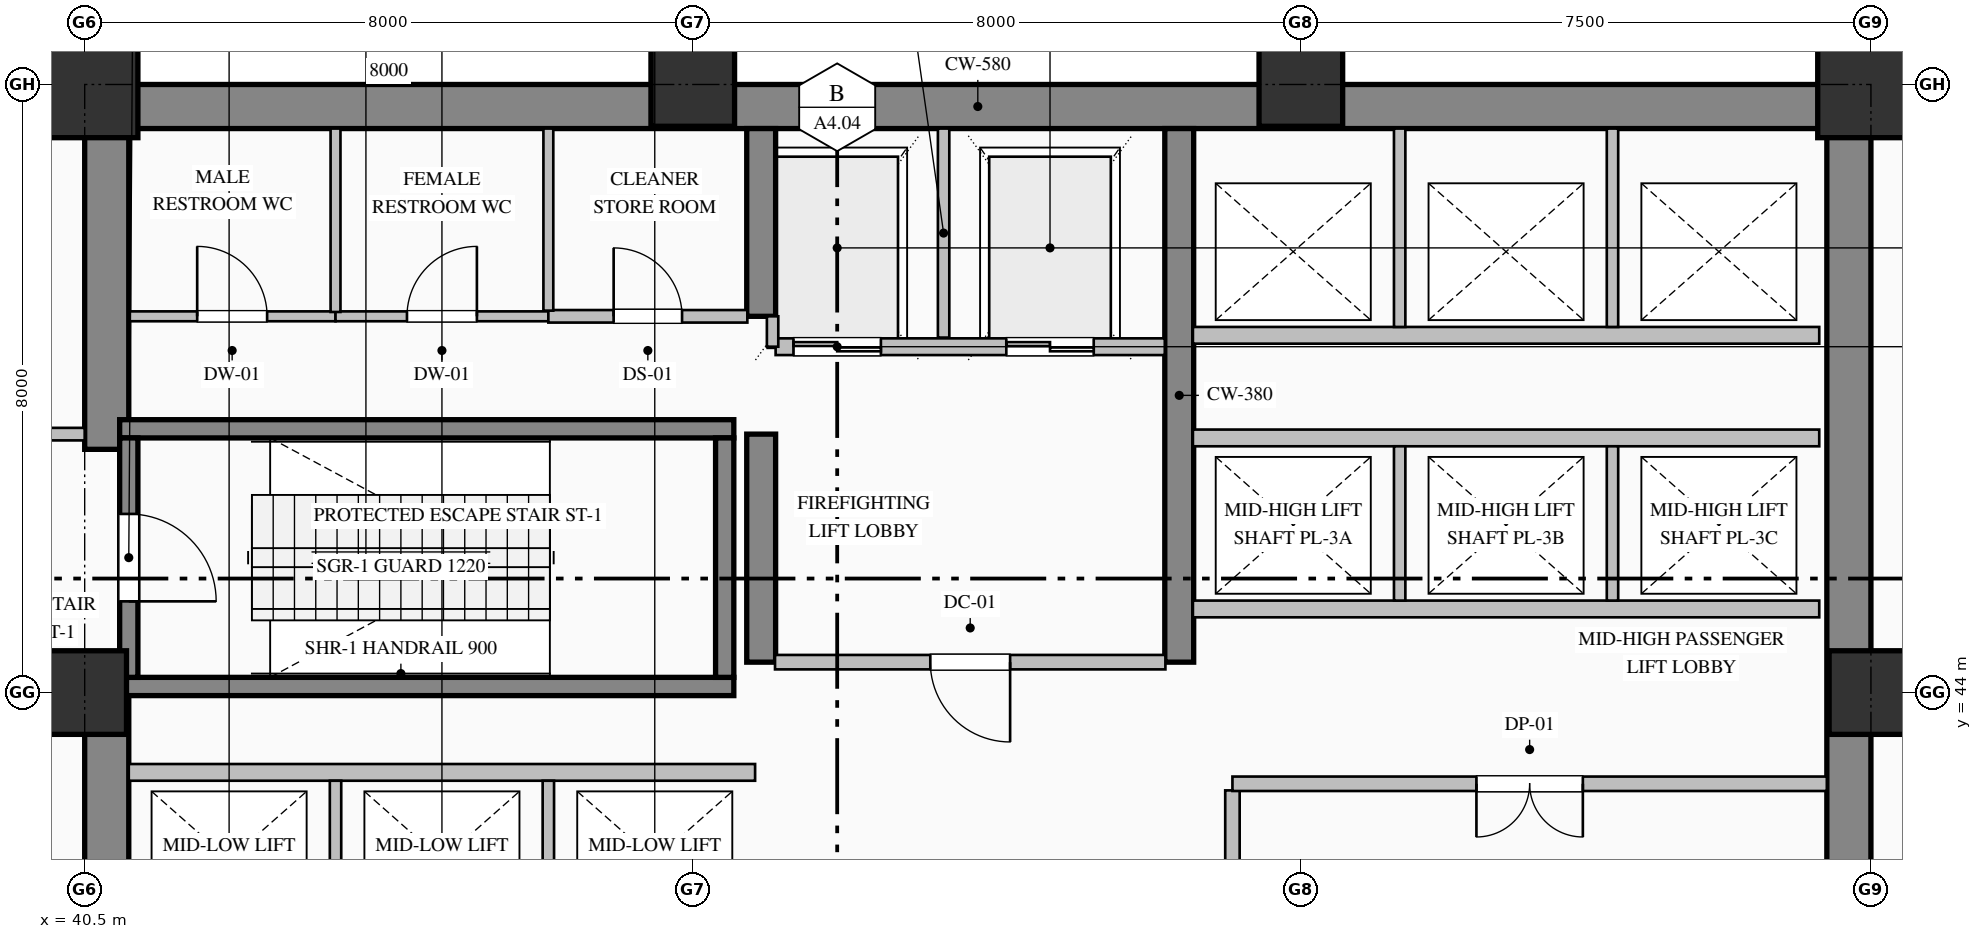
"""IFC4 building model, lengths in metres.
Left out: names, types, materials, properties, quantities, classifications, styles, units other than length and angle.
Written with IfcOpenShell. Run it as: python <this file> out.ifc"""

import sys

from ifc_helpers import new_model, si_unit, direction, frame, frame_2d, origin, origin_2d, place, context, subcontext, project, spatial, rectangle, hollow_rectangle, extrude, element, fill, save


model = new_model("IFC4")
c1 = context("Model", 3, precision=1e-05, world=origin(), true_north=direction((0.0, 1.0)))
c2 = subcontext(c1, "Body", "Model", "MODEL_VIEW")
j1 = project(units=[si_unit("LENGTHUNIT", "METRE"), si_unit("PLANEANGLEUNIT", "RADIAN")], contexts=[c1])
p1 = place(None, origin())
s1 = spatial("IfcSite", under=j1, at=p1, CompositionType="ELEMENT")
p2 = place(p1, origin())
s2 = spatial("IfcBuilding", under=s1, at=p2, CompositionType="ELEMENT")
p3 = place(p2, frame((0.0, 0.0, 22.8)))
s3 = spatial("IfcBuildingStorey", under=s2, at=p3, CompositionType="ELEMENT", Elevation=22.8)
p4 = place(p3, frame((40.5, 51.71, 0.0), z_axis=(0.0, 0.0, 1.0), x_axis=(1.0, 0.0, 0.0)))
e1 = element("IfcWall", 1, at=p4, inside=s3, PredefinedType="SHEAR", context=c2, shape_type="SweptSolid", body=[
    extrude(rectangle(XDim=23.5, YDim=0.58, at=frame_2d((11.75, 0.0))), origin(), (0.0, 0.0, 1.0), 5.15),
])
p5 = place(p3, frame((63.71, 36.32, 0.0), z_axis=(0.0, 0.0, 1.0), x_axis=(0.0, 1.0, 0.0)))
e2 = element("IfcWall", 2, at=p5, inside=s3, PredefinedType="SHEAR", context=c2, shape_type="SweptSolid", body=[
    extrude(rectangle(XDim=15.1, YDim=0.58, at=frame_2d((7.55, 0.0))), origin(), (0.0, 0.0, 1.0), 5.15),
])
p6 = place(p3, frame((40.79, 36.58, 0.0), z_axis=(0.0, 0.0, 1.0), x_axis=(0.0, 1.0, 0.0)))
e3 = element("IfcWall", 3, at=p6, inside=s3, PredefinedType="SHEAR", context=c2, shape_type="SweptSolid", body=[
    extrude(rectangle(XDim=7.82, YDim=0.58, at=frame_2d((3.91, 0.0))), origin(), (0.0, 0.0, 1.0), 5.15),
])
p7 = place(p3, frame((40.79, 47.2, 0.0), z_axis=(0.0, 0.0, 1.0), x_axis=(0.0, 1.0, 0.0)))
e4 = element("IfcWall", 4, at=p7, inside=s3, PredefinedType="SHEAR", context=c2, shape_type="SweptSolid", body=[
    extrude(rectangle(XDim=4.22, YDim=0.58, at=frame_2d((2.11, 0.0))), origin(), (0.0, 0.0, 1.0), 5.15),
])
p8 = place(p3, frame((49.4, 44.4, 0.0), z_axis=(0.0, 0.0, 1.0), x_axis=(0.0, 1.0, 0.0)))
e5 = element("IfcWall", 5, at=p8, inside=s3, PredefinedType="SHEAR", context=c2, shape_type="SweptSolid", body=[
    extrude(rectangle(XDim=3.0, YDim=0.38, at=frame_2d((1.5, 0.0))), origin(), (0.0, 0.0, 1.0), 5.15),
])
p9 = place(p3, frame((49.4, 48.95, 0.0), z_axis=(0.0, 0.0, 1.0), x_axis=(0.0, 1.0, 0.0)))
e6 = element("IfcWall", 6, at=p9, inside=s3, PredefinedType="SHEAR", context=c2, shape_type="SweptSolid", body=[
    extrude(rectangle(XDim=2.47, YDim=0.38, at=frame_2d((1.235, 0.0))), origin(), (0.0, 0.0, 1.0), 5.15),
])
p10 = place(p3, frame((54.9, 44.4, 0.0), z_axis=(0.0, 0.0, 1.0), x_axis=(0.0, 1.0, 0.0)))
e7 = element("IfcWall", 7, at=p10, inside=s3, PredefinedType="SHEAR", context=c2, shape_type="SweptSolid", body=[
    extrude(rectangle(XDim=7.02, YDim=0.38, at=frame_2d((3.51, 0.0))), origin(), (0.0, 0.0, 1.0), 5.15),
])
p11 = place(p3, frame((40.5, 44.0, 0.0), z_axis=(0.0, 0.0, 1.0), x_axis=(1.0, 0.0, 0.0)))
e8 = element("IfcColumn", 8, at=p11, inside=s3, PredefinedType="COLUMN", context=c2, shape_type="SweptSolid", body=[
    extrude(rectangle(XDim=1.1, YDim=1.1, at=origin_2d()), origin(), (0.0, 0.0, 1.0), 5.4),
])
p12 = place(p3, frame((40.5, 52.0, 0.0), z_axis=(0.0, 0.0, 1.0), x_axis=(1.0, 0.0, 0.0)))
e9 = element("IfcColumn", 9, at=p12, inside=s3, PredefinedType="COLUMN", context=c2, shape_type="SweptSolid", body=[
    extrude(hollow_rectangle(XDim=1.4, YDim=1.4, WallThickness=0.05, at=origin_2d()), origin(), (0.0, 0.0, 1.0), 5.4),
])
for number, where, z_axis, x_axis in (
    (10, (48.5, 52.0, 0.0), (0.0, 0.0, 1.0), (1.0, 0.0, 0.0)),
    (11, (56.5, 52.0, 0.0), (0.0, 0.0, 1.0), (1.0, 0.0, 0.0)),
):
    element("IfcColumn", number, at=place(p3, frame(where, z_axis=z_axis, x_axis=x_axis)), inside=s3, PredefinedType="COLUMN", context=c2, shape_type="SweptSolid", body=[
        extrude(hollow_rectangle(XDim=1.1, YDim=1.1, WallThickness=0.04, at=origin_2d()), origin(), (0.0, 0.0, 1.0), 5.4),
    ])
p13 = place(p3, frame((64.0, 44.0, 0.0), z_axis=(0.0, 0.0, 1.0), x_axis=(1.0, 0.0, 0.0)))
e12 = element("IfcColumn", 12, at=p13, inside=s3, PredefinedType="COLUMN", context=c2, shape_type="SweptSolid", body=[
    extrude(rectangle(XDim=1.1, YDim=1.1, at=origin_2d()), origin(), (0.0, 0.0, 1.0), 5.4),
])
p14 = place(p3, frame((64.0, 52.0, 0.0), z_axis=(0.0, 0.0, 1.0), x_axis=(1.0, 0.0, 0.0)))
e13 = element("IfcColumn", 13, at=p14, inside=s3, PredefinedType="COLUMN", context=c2, shape_type="SweptSolid", body=[
    extrude(hollow_rectangle(XDim=1.4, YDim=1.4, WallThickness=0.05, at=origin_2d()), origin(), (0.0, 0.0, 1.0), 5.4),
])
p15 = place(p3, frame((63.98, 51.81, 0.0), z_axis=(0.0, 0.0, 1.0), x_axis=(1.0, 0.0, 0.0)))
e14 = element("IfcWall", 14, at=p15, inside=s3, PredefinedType="SOLIDWALL", context=c2, shape_type="SweptSolid", body=[
    extrude(rectangle(XDim=4.02, YDim=0.38, at=frame_2d((2.01, 0.0))), origin(), (0.0, 0.0, 1.0), 5.15),
])
p16 = place(p3, frame((4.0, 51.81, 0.0), z_axis=(0.0, 0.0, 1.0), x_axis=(1.0, 0.0, 0.0)))
e15 = element("IfcWall", 15, at=p16, inside=s3, PredefinedType="SOLIDWALL", context=c2, shape_type="SweptSolid", body=[
    extrude(rectangle(XDim=36.52, YDim=0.38, at=frame_2d((18.26, 0.0))), origin(), (0.0, 0.0, 1.0), 4.65),
])
p17 = place(p16, frame((16.7, 0.0, 0.85)))
e16 = element("IfcOpeningElement", 16, at=p17, cuts=e15, PredefinedType="OPENING", context=c2, shape_type="SweptSolid", body=[
    extrude(rectangle(XDim=2.6, YDim=3.1, at=frame_2d((1.3, 1.55))), frame((0.0, 0.2, 0.0), z_axis=(0.0, -1.0, 0.0), x_axis=(1.0, 0.0, 0.0)), (0.0, 0.0, 1.0), 0.4),
])
p18 = place(p16, frame((24.1, 0.0, 0.9)))
e17 = element("IfcOpeningElement", 17, at=p18, cuts=e15, PredefinedType="OPENING", context=c2, shape_type="SweptSolid", body=[
    extrude(rectangle(XDim=2.2, YDim=2.65, at=frame_2d((1.1, 1.325))), frame((0.0, 0.2, 0.0), z_axis=(0.0, -1.0, 0.0), x_axis=(1.0, 0.0, 0.0)), (0.0, 0.0, 1.0), 0.4),
])
for number, where, z_axis, x_axis in (
    (18, (40.96, 47.47, 0.0), (0.0, 0.0, 1.0), (1.0, 0.0, 0.0)),
    (19, (49.04, 44.08, 0.0), (0.0, 0.0, 1.0), (-1.0, 0.0, 0.0)),
):
    element("IfcWall", number, at=place(p3, frame(where, z_axis=z_axis, x_axis=x_axis)), inside=s3, PredefinedType="SOLIDWALL", context=c2, shape_type="SweptSolid", body=[
        extrude(rectangle(XDim=8.08, YDim=0.24, at=frame_2d((4.04, 0.0))), origin(), (0.0, 0.0, 1.0), 5.4),
    ])
p19 = place(p3, frame((41.08, 47.35, 0.0), z_axis=(0.0, 0.0, 1.0), x_axis=(0.0, -1.0, 0.0)))
e20 = element("IfcWall", 20, at=p19, inside=s3, PredefinedType="SOLIDWALL", context=c2, shape_type="SweptSolid", body=[
    extrude(rectangle(XDim=3.15, YDim=0.24, at=frame_2d((1.575, 0.0))), origin(), (0.0, 0.0, 1.0), 5.4),
])
p20 = place(p19, frame((1.0, 0.0, 0.0)))
e21 = element("IfcOpeningElement", 21, at=p20, cuts=e20, PredefinedType="OPENING", context=c2, shape_type="SweptSolid", body=[
    extrude(rectangle(XDim=1.15, YDim=2.2, at=frame_2d((0.575, 1.1))), frame((0.0, 0.13, 0.0), z_axis=(0.0, -1.0, 0.0), x_axis=(1.0, 0.0, 0.0)), (0.0, 0.0, 1.0), 0.26),
])
p21 = place(p3, frame((48.92, 44.2, 0.0), z_axis=(0.0, 0.0, 1.0), x_axis=(0.0, 1.0, 0.0)))
e22 = element("IfcWall", 22, at=p21, inside=s3, PredefinedType="SOLIDWALL", context=c2, shape_type="SweptSolid", body=[
    extrude(rectangle(XDim=3.15, YDim=0.24, at=frame_2d((1.575, 0.0))), origin(), (0.0, 0.0, 1.0), 5.4),
])
p22 = place(p3, frame((54.71, 48.55, 0.0), z_axis=(0.0, 0.0, 1.0), x_axis=(-1.0, 0.0, 0.0)))
e23 = element("IfcWall", 23, at=p22, inside=s3, PredefinedType="PARTITIONING", context=c2, shape_type="SweptSolid", body=[
    extrude(rectangle(XDim=5.12, YDim=0.22, at=frame_2d((2.56, 0.0))), origin(), (0.0, 0.0, 1.0), 5.15),
])
p23 = place(p22, frame((3.735, 0.0, 0.0)))
e24 = element("IfcOpeningElement", 24, at=p23, cuts=e23, PredefinedType="OPENING", context=c2, shape_type="SweptSolid", body=[
    extrude(rectangle(XDim=1.15, YDim=2.2, at=frame_2d((0.575, 1.1))), frame((0.0, 0.12, 0.0), z_axis=(0.0, -1.0, 0.0), x_axis=(1.0, 0.0, 0.0)), (0.0, 0.0, 1.0), 0.24),
])
p24 = place(p22, frame((0.935, 0.0, 0.0)))
e25 = element("IfcOpeningElement", 25, at=p24, cuts=e23, PredefinedType="OPENING", context=c2, shape_type="SweptSolid", body=[
    extrude(rectangle(XDim=1.15, YDim=2.2, at=frame_2d((0.575, 1.1))), frame((0.0, 0.12, 0.0), z_axis=(0.0, -1.0, 0.0), x_axis=(1.0, 0.0, 0.0)), (0.0, 0.0, 1.0), 0.24),
])
p25 = place(p3, frame((51.8, 48.67, 0.0), z_axis=(0.0, 0.0, 1.0), x_axis=(0.0, 1.0, 0.0)))
e26 = element("IfcWall", 26, at=p25, inside=s3, PredefinedType="PARTITIONING", context=c2, shape_type="SweptSolid", body=[
    extrude(rectangle(XDim=2.75, YDim=0.15, at=frame_2d((1.375, 0.0))), origin(), (0.0, 0.0, 1.0), 5.15),
])
p26 = place(p3, frame((49.55, 48.55, 0.0), z_axis=(0.0, 0.0, 1.0), x_axis=(0.0, 1.0, 0.0)))
e27 = element("IfcWall", 27, at=p26, inside=s3, PredefinedType="PARTITIONING", context=c2, shape_type="SweptSolid", body=[
    extrude(rectangle(XDim=0.4, YDim=0.15, at=frame_2d((0.2, 0.0))), origin(), (0.0, 0.0, 1.0), 5.15),
])
p27 = place(p3, frame((41.08, 42.95, 0.0), z_axis=(0.0, 0.0, 1.0), x_axis=(1.0, 0.0, 0.0)))
e28 = element("IfcWall", 28, at=p27, inside=s3, PredefinedType="PARTITIONING", context=c2, shape_type="SweptSolid", body=[
    extrude(rectangle(XDim=8.24, YDim=0.22, at=frame_2d((4.12, 0.0))), origin(), (0.0, 0.0, 1.0), 5.15),
])
for number, where, z_axis, x_axis in (
    (29, (43.8, 40.76, 0.0), (0.0, 0.0, 1.0), (0.0, 1.0, 0.0)),
    (30, (46.6, 40.76, 0.0), (0.0, 0.0, 1.0), (0.0, 1.0, 0.0)),
):
    element("IfcWall", number, at=place(p3, frame(where, z_axis=z_axis, x_axis=x_axis)), inside=s3, PredefinedType="PARTITIONING", context=c2, shape_type="SweptSolid", body=[
        extrude(rectangle(XDim=2.08, YDim=0.15, at=frame_2d((1.04, 0.0))), origin(), (0.0, 0.0, 1.0), 5.15),
    ])
for number, where, z_axis, x_axis in (
    (31, (63.32, 45.1, 0.0), (0.0, 0.0, 1.0), (-1.0, 0.0, 0.0)),
    (32, (55.08, 47.35, 0.0), (0.0, 0.0, 1.0), (1.0, 0.0, 0.0)),
):
    element("IfcWall", number, at=place(p3, frame(where, z_axis=z_axis, x_axis=x_axis)), inside=s3, PredefinedType="PARTITIONING", context=c2, shape_type="SweptSolid", body=[
        extrude(rectangle(XDim=8.24, YDim=0.22, at=frame_2d((4.12, 0.0))), origin(), (0.0, 0.0, 1.0), 5.15),
    ])
for number, where, z_axis, x_axis in (
    (33, (57.8, 45.21, 0.0), (0.0, 0.0, 1.0), (0.0, 1.0, 0.0)),
    (34, (60.6, 45.21, 0.0), (0.0, 0.0, 1.0), (0.0, 1.0, 0.0)),
):
    element("IfcWall", number, at=place(p3, frame(where, z_axis=z_axis, x_axis=x_axis)), inside=s3, PredefinedType="PARTITIONING", context=c2, shape_type="SweptSolid", body=[
        extrude(rectangle(XDim=2.03, YDim=0.15, at=frame_2d((1.015, 0.0))), origin(), (0.0, 0.0, 1.0), 5.15),
    ])
p28 = place(p3, frame((63.32, 48.7, 0.0), z_axis=(0.0, 0.0, 1.0), x_axis=(-1.0, 0.0, 0.0)))
e35 = element("IfcWall", 35, at=p28, inside=s3, PredefinedType="PARTITIONING", context=c2, shape_type="SweptSolid", body=[
    extrude(rectangle(XDim=8.24, YDim=0.22, at=frame_2d((4.12, 0.0))), origin(), (0.0, 0.0, 1.0), 5.15),
])
for number, where, z_axis, x_axis in (
    (36, (57.8, 48.81, 0.0), (0.0, 0.0, 1.0), (0.0, 1.0, 0.0)),
    (37, (60.6, 48.81, 0.0), (0.0, 0.0, 1.0), (0.0, 1.0, 0.0)),
):
    element("IfcWall", number, at=place(p3, frame(where, z_axis=z_axis, x_axis=x_axis)), inside=s3, PredefinedType="PARTITIONING", context=c2, shape_type="SweptSolid", body=[
        extrude(rectangle(XDim=2.61, YDim=0.15, at=frame_2d((1.305, 0.0))), origin(), (0.0, 0.0, 1.0), 5.15),
    ])
p29 = place(p3, frame((37.8, 47.4, 0.0), z_axis=(0.0, 0.0, 1.0), x_axis=(1.0, 0.0, 0.0)))
e38 = element("IfcWall", 38, at=p29, inside=s3, PredefinedType="PARTITIONING", context=c2, shape_type="SweptSolid", body=[
    extrude(rectangle(XDim=2.7, YDim=0.165, at=frame_2d((1.35, 0.0))), origin(), (0.0, 0.0, 1.0), 5.15),
])
p30 = place(p29, frame((0.825, 0.0, 0.0)))
e39 = element("IfcOpeningElement", 39, at=p30, cuts=e38, PredefinedType="OPENING", context=c2, shape_type="SweptSolid", body=[
    extrude(rectangle(XDim=1.05, YDim=2.15, at=frame_2d((0.525, 1.075))), frame((0.0, 0.093, 0.0), z_axis=(0.0, -1.0, 0.0), x_axis=(1.0, 0.0, 0.0)), (0.0, 0.0, 1.0), 0.185),
])
p31 = place(p3, frame((41.08, 48.95, 0.0), z_axis=(0.0, 0.0, 1.0), x_axis=(1.0, 0.0, 0.0)))
e40 = element("IfcWall", 40, at=p31, inside=s3, PredefinedType="PARTITIONING", context=c2, shape_type="SweptSolid", body=[
    extrude(rectangle(XDim=2.72, YDim=0.13, at=frame_2d((1.36, 0.0))), origin(), (0.0, 0.0, 1.0), 5.15),
])
p32 = place(p31, frame((0.9, 0.0, 0.0)))
e41 = element("IfcOpeningElement", 41, at=p32, cuts=e40, PredefinedType="OPENING", context=c2, shape_type="SweptSolid", body=[
    extrude(rectangle(XDim=0.92, YDim=2.15, at=frame_2d((0.46, 1.075))), frame((0.0, 0.075, 0.0), z_axis=(0.0, -1.0, 0.0), x_axis=(1.0, 0.0, 0.0)), (0.0, 0.0, 1.0), 0.15),
])
p33 = place(p3, frame((43.8, 48.95, 0.0), z_axis=(0.0, 0.0, 1.0), x_axis=(1.0, 0.0, 0.0)))
e42 = element("IfcWall", 42, at=p33, inside=s3, PredefinedType="PARTITIONING", context=c2, shape_type="SweptSolid", body=[
    extrude(rectangle(XDim=2.8, YDim=0.13, at=frame_2d((1.4, 0.0))), origin(), (0.0, 0.0, 1.0), 5.15),
])
p34 = place(p33, frame((0.94, 0.0, 0.0)))
e43 = element("IfcOpeningElement", 43, at=p34, cuts=e42, PredefinedType="OPENING", context=c2, shape_type="SweptSolid", body=[
    extrude(rectangle(XDim=0.92, YDim=2.15, at=frame_2d((0.46, 1.075))), frame((0.0, 0.075, 0.0), z_axis=(0.0, -1.0, 0.0), x_axis=(1.0, 0.0, 0.0)), (0.0, 0.0, 1.0), 0.15),
])
p35 = place(p3, frame((46.6, 48.95, 0.0), z_axis=(0.0, 0.0, 1.0), x_axis=(1.0, 0.0, 0.0)))
e44 = element("IfcWall", 44, at=p35, inside=s3, PredefinedType="PARTITIONING", context=c2, shape_type="SweptSolid", body=[
    extrude(rectangle(XDim=2.618, YDim=0.165, at=frame_2d((1.309, 0.0))), origin(), (0.0, 0.0, 1.0), 5.15),
])
p36 = place(p35, frame((0.859, 0.0, 0.0)))
e45 = element("IfcOpeningElement", 45, at=p36, cuts=e44, PredefinedType="OPENING", context=c2, shape_type="SweptSolid", body=[
    extrude(rectangle(XDim=0.9, YDim=2.15, at=frame_2d((0.45, 1.075))), frame((0.0, 0.093, 0.0), z_axis=(0.0, -1.0, 0.0), x_axis=(1.0, 0.0, 0.0)), (0.0, 0.0, 1.0), 0.185),
])
p37 = place(p3, frame((54.718, 44.4, 0.0), z_axis=(0.0, 0.0, 1.0), x_axis=(-1.0, 0.0, 0.0)))
e46 = element("IfcWall", 46, at=p37, inside=s3, PredefinedType="PARTITIONING", context=c2, shape_type="SweptSolid", body=[
    extrude(rectangle(XDim=5.136, YDim=0.19, at=frame_2d((2.568, 0.0))), origin(), (0.0, 0.0, 1.0), 5.15),
])
p38 = place(p37, frame((2.043, 0.0, 0.0)))
e47 = element("IfcOpeningElement", 47, at=p38, cuts=e46, PredefinedType="OPENING", context=c2, shape_type="SweptSolid", body=[
    extrude(rectangle(XDim=1.05, YDim=2.15, at=frame_2d((0.525, 1.075))), frame((0.0, 0.105, 0.0), z_axis=(0.0, -1.0, 0.0), x_axis=(1.0, 0.0, 0.0)), (0.0, 0.0, 1.0), 0.21),
])
p39 = place(p3, frame((55.6, 42.713, 0.0), z_axis=(0.0, 0.0, 1.0), x_axis=(0.0, -1.0, 0.0)))
e48 = element("IfcWall", 48, at=p39, inside=s3, PredefinedType="PARTITIONING", context=c2, shape_type="SweptSolid", body=[
    extrude(rectangle(XDim=2.731, YDim=0.19, at=frame_2d((1.365, 0.0))), origin(), (0.0, 0.0, 1.0), 5.15),
])
p40 = place(p3, frame((63.42, 42.8, 0.0), z_axis=(0.0, 0.0, 1.0), x_axis=(-1.0, 0.0, 0.0)))
e49 = element("IfcWall", 49, at=p40, inside=s3, PredefinedType="PARTITIONING", context=c2, shape_type="SweptSolid", body=[
    extrude(rectangle(XDim=7.82, YDim=0.19, at=frame_2d((3.91, 0.0))), origin(), (0.0, 0.0, 1.0), 5.15),
])
p41 = place(p40, frame((3.21, 0.0, 0.0)))
e50 = element("IfcOpeningElement", 50, at=p41, cuts=e49, PredefinedType="OPENING", context=c2, shape_type="SweptSolid", body=[
    extrude(rectangle(XDim=1.4, YDim=2.25, at=frame_2d((0.7, 1.125))), frame((0.0, 0.105, 0.0), z_axis=(0.0, -1.0, 0.0), x_axis=(1.0, 0.0, 0.0)), (0.0, 0.0, 1.0), 0.21),
])
p42 = place(p3, frame((43.8, 51.42, 0.0), z_axis=(0.0, 0.0, 1.0), x_axis=(0.0, -1.0, 0.0)))
e51 = element("IfcWall", 51, at=p42, inside=s3, PredefinedType="PARTITIONING", context=c2, shape_type="SweptSolid", body=[
    extrude(rectangle(XDim=2.413, YDim=0.13, at=frame_2d((1.207, 0.0))), origin(), (0.0, 0.0, 1.0), 5.15),
])
p43 = place(p3, frame((46.6, 51.42, 0.0), z_axis=(0.0, 0.0, 1.0), x_axis=(0.0, -1.0, 0.0)))
e52 = element("IfcWall", 52, at=p43, inside=s3, PredefinedType="PARTITIONING", context=c2, shape_type="SweptSolid", body=[
    extrude(rectangle(XDim=2.396, YDim=0.13, at=frame_2d((1.198, 0.0))), origin(), (0.0, 0.0, 1.0), 5.15),
])
p44 = place(p20, origin())
e53 = element("IfcDoor", 53, at=p44, inside=s3, OperationType="SINGLE_SWING_RIGHT", PredefinedType="DOOR", context=c2, shape_type="SweptSolid", body=[
    extrude(rectangle(XDim=1.15, YDim=2.2, at=frame_2d((0.575, 1.1))), frame((0.0, 0.025, 0.0), z_axis=(0.0, -1.0, 0.0), x_axis=(1.0, 0.0, 0.0)), (0.0, 0.0, 1.0), 0.05),
])
fill(e21, e53)
p45 = place(p23, origin())
e54 = element("IfcDoor", 54, at=p45, inside=s3, OperationType="DOUBLE_DOOR_SLIDING", PredefinedType="DOOR", context=c2, shape_type="SweptSolid", body=[
    extrude(rectangle(XDim=1.15, YDim=2.2, at=frame_2d((0.575, 1.1))), frame((0.0, 0.025, 0.0), z_axis=(0.0, -1.0, 0.0), x_axis=(1.0, 0.0, 0.0)), (0.0, 0.0, 1.0), 0.05),
])
fill(e24, e54)
p46 = place(p24, origin())
e55 = element("IfcDoor", 55, at=p46, inside=s3, OperationType="DOUBLE_DOOR_SLIDING", PredefinedType="DOOR", context=c2, shape_type="SweptSolid", body=[
    extrude(rectangle(XDim=1.15, YDim=2.2, at=frame_2d((0.575, 1.1))), frame((0.0, 0.025, 0.0), z_axis=(0.0, -1.0, 0.0), x_axis=(1.0, 0.0, 0.0)), (0.0, 0.0, 1.0), 0.05),
])
fill(e25, e55)
p47 = place(p38, origin())
e56 = element("IfcDoor", 56, at=p47, inside=s3, OperationType="SINGLE_SWING_LEFT", PredefinedType="DOOR", context=c2, shape_type="SweptSolid", body=[
    extrude(rectangle(XDim=1.05, YDim=2.15, at=frame_2d((0.525, 1.075))), frame((0.0, 0.025, 0.0), z_axis=(0.0, -1.0, 0.0), x_axis=(1.0, 0.0, 0.0)), (0.0, 0.0, 1.0), 0.05),
])
fill(e47, e56)
p48 = place(p32, origin())
e57 = element("IfcDoor", 57, at=p48, inside=s3, OperationType="SINGLE_SWING_LEFT", PredefinedType="DOOR", context=c2, shape_type="SweptSolid", body=[
    extrude(rectangle(XDim=0.92, YDim=2.15, at=frame_2d((0.46, 1.075))), frame((0.0, 0.025, 0.0), z_axis=(0.0, -1.0, 0.0), x_axis=(1.0, 0.0, 0.0)), (0.0, 0.0, 1.0), 0.05),
])
fill(e41, e57)
p49 = place(p34, origin())
e58 = element("IfcDoor", 58, at=p49, inside=s3, OperationType="SINGLE_SWING_RIGHT", PredefinedType="DOOR", context=c2, shape_type="SweptSolid", body=[
    extrude(rectangle(XDim=0.92, YDim=2.15, at=frame_2d((0.46, 1.075))), frame((0.0, 0.025, 0.0), z_axis=(0.0, -1.0, 0.0), x_axis=(1.0, 0.0, 0.0)), (0.0, 0.0, 1.0), 0.05),
])
fill(e43, e58)
p50 = place(p36, origin())
e59 = element("IfcDoor", 59, at=p50, inside=s3, OperationType="SINGLE_SWING_LEFT", PredefinedType="DOOR", context=c2, shape_type="SweptSolid", body=[
    extrude(rectangle(XDim=0.9, YDim=2.15, at=frame_2d((0.45, 1.075))), frame((0.0, 0.025, 0.0), z_axis=(0.0, -1.0, 0.0), x_axis=(1.0, 0.0, 0.0)), (0.0, 0.0, 1.0), 0.05),
])
fill(e45, e59)
p51 = place(p41, origin())
e60 = element("IfcDoor", 60, at=p51, inside=s3, OperationType="DOUBLE_DOOR_SINGLE_SWING", PredefinedType="DOOR", context=c2, shape_type="SweptSolid", body=[
    extrude(rectangle(XDim=1.4, YDim=2.25, at=frame_2d((0.7, 1.125))), frame((0.0, 0.025, 0.0), z_axis=(0.0, -1.0, 0.0), x_axis=(1.0, 0.0, 0.0)), (0.0, 0.0, 1.0), 0.05),
])
fill(e50, e60)
save(model, sys.argv[1])
